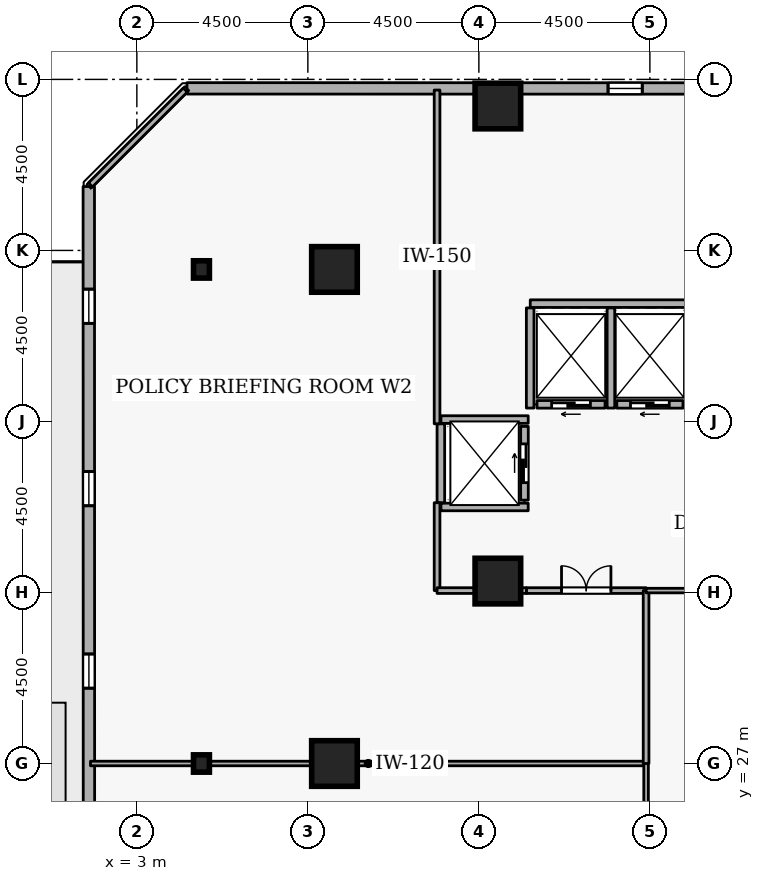
"""IFC4 building model, lengths in metres.
Left out: names, types, materials, properties, quantities, classifications, styles, units other than length and angle.
Written with IfcOpenShell. Run it as: python <this file> out.ifc"""

import sys

from ifc_helpers import new_model, si_unit, direction, frame, frame_2d, origin, origin_2d, place, context, subcontext, project, spatial, rectangle, i_section, extrude, element, fill, save


model = new_model("IFC4")
c1 = context("Model", 3, precision=1e-05, world=origin(), true_north=direction((0.0, 1.0)))
c2 = subcontext(c1, "Body", "Model", "MODEL_VIEW")
j1 = project(units=[si_unit("LENGTHUNIT", "METRE"), si_unit("PLANEANGLEUNIT", "RADIAN")], contexts=[c1])
p1 = place(None, origin())
s1 = spatial("IfcSite", under=j1, at=p1, CompositionType="ELEMENT")
p2 = place(p1, origin())
s2 = spatial("IfcBuilding", under=s1, at=p2, CompositionType="ELEMENT")
p3 = place(p2, frame((0.0, 0.0, 134.1)))
s3 = spatial("IfcBuildingStorey", under=s2, at=p3, CompositionType="ELEMENT", Elevation=134.1)
for number, where, z_axis, x_axis in (
    (1, (12.5, 44.3, 0.0), (0.0, 0.0, 1.0), (1.0, 0.0, 0.0)),
    (2, (8.2, 27.0, 0.0), (0.0, 0.0, 1.0), (1.0, 0.0, 0.0)),
    (3, (8.2, 40.0, 0.0), (0.0, 0.0, 1.0), (1.0, 0.0, 0.0)),
    (4, (12.5, 31.8, 0.0), (0.0, 0.0, 1.0), (1.0, 0.0, 0.0)),
):
    element("IfcColumn", number, at=place(p3, frame(where, z_axis=z_axis, x_axis=x_axis)), inside=s3, PredefinedType="COLUMN", context=c2, shape_type="SweptSolid", body=[
        extrude(rectangle(XDim=1.2, YDim=1.2, at=origin_2d()), origin(), (0.0, 0.0, 1.0), 3.6),
    ])
for number, where, z_axis, x_axis in (
    (5, (4.7, 27.0, 0.0), (0.0, 0.0, 1.0), (1.0, 0.0, 0.0)),
    (6, (4.7, 40.0, 0.0), (0.0, 0.0, 1.0), (1.0, 0.0, 0.0)),
):
    element("IfcColumn", number, at=place(p3, frame(where, z_axis=z_axis, x_axis=x_axis)), inside=s3, PredefinedType="COLUMN", context=c2, shape_type="SweptSolid", body=[
        extrude(i_section(OverallWidth=0.418, OverallDepth=0.456, WebThickness=0.042, FlangeThickness=0.067, FilletRadius=0.015, at=origin_2d()), origin(), (0.0, 0.0, 1.0), 3.6),
    ])
p4 = place(p3, frame((38.199, 44.756, 0.0), z_axis=(0.0, 0.0, 1.0), x_axis=(-0.999999969988, 0.000244999128, 0.0)))
e7 = element("IfcWall", 7, at=p4, inside=s3, PredefinedType="STANDARD", context=c2, shape_type="SweptSolid", body=[
    extrude(rectangle(XDim=33.881, YDim=0.3, at=frame_2d((16.94, 0.0))), origin(), (0.0, 0.0, 1.0), 2.7),
])
p5 = place(p4, frame((2.7, 0.0, 0.72)))
e8 = element("IfcOpeningElement", 8, at=p5, cuts=e7, PredefinedType="OPENING", context=c2, shape_type="SweptSolid", body=[
    extrude(rectangle(XDim=0.9, YDim=1.75, at=frame_2d((0.45, 0.875))), frame((0.0, 0.16, 0.0), z_axis=(0.0, -1.0, 0.0), x_axis=(1.0, 0.0, 0.0)), (0.0, 0.0, 1.0), 0.32),
])
p6 = place(p4, frame((7.5, 0.0, 0.72)))
e9 = element("IfcOpeningElement", 9, at=p6, cuts=e7, PredefinedType="OPENING", context=c2, shape_type="SweptSolid", body=[
    extrude(rectangle(XDim=0.9, YDim=1.75, at=frame_2d((0.45, 0.875))), frame((0.0, 0.16, 0.0), z_axis=(0.0, -1.0, 0.0), x_axis=(1.0, 0.0, 0.0)), (0.0, 0.0, 1.0), 0.32),
])
p7 = place(p4, frame((17.1, 0.0, 0.72)))
e10 = element("IfcOpeningElement", 10, at=p7, cuts=e7, PredefinedType="OPENING", context=c2, shape_type="SweptSolid", body=[
    extrude(rectangle(XDim=0.9, YDim=1.75, at=frame_2d((0.45, 0.875))), frame((0.0, 0.16, 0.0), z_axis=(0.0, -1.0, 0.0), x_axis=(1.0, 0.0, 0.0)), (0.0, 0.0, 1.0), 0.32),
])
p8 = place(p4, frame((21.9, 0.0, 0.72)))
e11 = element("IfcOpeningElement", 11, at=p8, cuts=e7, PredefinedType="OPENING", context=c2, shape_type="SweptSolid", body=[
    extrude(rectangle(XDim=0.9, YDim=1.75, at=frame_2d((0.45, 0.875))), frame((0.0, 0.16, 0.0), z_axis=(0.0, -1.0, 0.0), x_axis=(1.0, 0.0, 0.0)), (0.0, 0.0, 1.0), 0.32),
])
p9 = place(p3, frame((1.735, 42.181, 0.0), z_axis=(0.0, 0.0, 1.0), x_axis=(0.000244999128, -0.999999969988, 0.0)))
e12 = element("IfcWall", 12, at=p9, inside=s3, PredefinedType="STANDARD", context=c2, shape_type="SweptSolid", body=[
    extrude(rectangle(XDim=33.881, YDim=0.3, at=frame_2d((16.94, 0.0))), origin(), (0.0, 0.0, 1.0), 2.7),
])
p10 = place(p9, frame((18.74, 0.0, 0.0)))
e13 = element("IfcOpeningElement", 13, at=p10, cuts=e12, PredefinedType="OPENING", context=c2, shape_type="SweptSolid", body=[
    extrude(rectangle(XDim=1.0, YDim=2.08, at=frame_2d((0.5, 1.04))), frame((0.0, 0.16, 0.0), z_axis=(0.0, -1.0, 0.0), x_axis=(1.0, 0.0, 0.0)), (0.0, 0.0, 1.0), 0.32),
])
p11 = place(p9, frame((2.7, 0.0, 0.72)))
e14 = element("IfcOpeningElement", 14, at=p11, cuts=e12, PredefinedType="OPENING", context=c2, shape_type="SweptSolid", body=[
    extrude(rectangle(XDim=0.9, YDim=1.75, at=frame_2d((0.45, 0.875))), frame((0.0, 0.16, 0.0), z_axis=(0.0, -1.0, 0.0), x_axis=(1.0, 0.0, 0.0)), (0.0, 0.0, 1.0), 0.32),
])
p12 = place(p9, frame((7.5, 0.0, 0.72)))
e15 = element("IfcOpeningElement", 15, at=p12, cuts=e12, PredefinedType="OPENING", context=c2, shape_type="SweptSolid", body=[
    extrude(rectangle(XDim=0.9, YDim=1.75, at=frame_2d((0.45, 0.875))), frame((0.0, 0.16, 0.0), z_axis=(0.0, -1.0, 0.0), x_axis=(1.0, 0.0, 0.0)), (0.0, 0.0, 1.0), 0.32),
])
p13 = place(p9, frame((12.3, 0.0, 0.72)))
e16 = element("IfcOpeningElement", 16, at=p13, cuts=e12, PredefinedType="OPENING", context=c2, shape_type="SweptSolid", body=[
    extrude(rectangle(XDim=0.9, YDim=1.75, at=frame_2d((0.45, 0.875))), frame((0.0, 0.16, 0.0), z_axis=(0.0, -1.0, 0.0), x_axis=(1.0, 0.0, 0.0)), (0.0, 0.0, 1.0), 0.32),
])
p14 = place(p9, frame((21.9, 0.0, 0.72)))
e17 = element("IfcOpeningElement", 17, at=p14, cuts=e12, PredefinedType="OPENING", context=c2, shape_type="SweptSolid", body=[
    extrude(rectangle(XDim=0.9, YDim=1.75, at=frame_2d((0.45, 0.875))), frame((0.0, 0.16, 0.0), z_axis=(0.0, -1.0, 0.0), x_axis=(1.0, 0.0, 0.0)), (0.0, 0.0, 1.0), 0.32),
])
p15 = place(p9, frame((26.7, 0.0, 0.72)))
e18 = element("IfcOpeningElement", 18, at=p15, cuts=e12, PredefinedType="OPENING", context=c2, shape_type="SweptSolid", body=[
    extrude(rectangle(XDim=0.9, YDim=1.75, at=frame_2d((0.45, 0.875))), frame((0.0, 0.16, 0.0), z_axis=(0.0, -1.0, 0.0), x_axis=(1.0, 0.0, 0.0)), (0.0, 0.0, 1.0), 0.32),
])
p16 = place(p3, frame((17.37, 36.45, 0.0), z_axis=(0.0, 0.0, 1.0), x_axis=(-1.0, 0.0, 0.0)))
e19 = element("IfcWall", 19, at=p16, inside=s3, PredefinedType="STANDARD", context=c2, shape_type="SweptSolid", body=[
    extrude(rectangle(XDim=1.74, YDim=0.2, at=frame_2d((0.87, 0.0))), origin(), (0.0, 0.0, 1.0), 3.34),
])
p17 = place(p16, frame((0.36, 0.0, 0.0)))
e20 = element("IfcOpeningElement", 20, at=p17, cuts=e19, PredefinedType="OPENING", context=c2, shape_type="SweptSolid", body=[
    extrude(rectangle(XDim=1.02, YDim=2.06, at=frame_2d((0.51, 1.03))), frame((0.0, 0.11, 0.0), z_axis=(0.0, -1.0, 0.0), x_axis=(1.0, 0.0, 0.0)), (0.0, 0.0, 1.0), 0.22),
])
p18 = place(p3, frame((15.32, 36.45, 0.0), z_axis=(0.0, 0.0, 1.0), x_axis=(-1.0, 0.0, 0.0)))
e21 = element("IfcWall", 21, at=p18, inside=s3, PredefinedType="STANDARD", context=c2, shape_type="SweptSolid", body=[
    extrude(rectangle(XDim=1.79, YDim=0.2, at=frame_2d((0.895, 0.0))), origin(), (0.0, 0.0, 1.0), 3.34),
])
p19 = place(p18, frame((0.385, 0.0, 0.0)))
e22 = element("IfcOpeningElement", 22, at=p19, cuts=e21, PredefinedType="OPENING", context=c2, shape_type="SweptSolid", body=[
    extrude(rectangle(XDim=1.02, YDim=2.06, at=frame_2d((0.51, 1.03))), frame((0.0, 0.11, 0.0), z_axis=(0.0, -1.0, 0.0), x_axis=(1.0, 0.0, 0.0)), (0.0, 0.0, 1.0), 0.22),
])
p20 = place(p3, frame((13.2, 33.93, 0.0), z_axis=(0.0, 0.0, 1.0), x_axis=(0.0, 1.0, 0.0)))
e23 = element("IfcWall", 23, at=p20, inside=s3, PredefinedType="STANDARD", context=c2, shape_type="SweptSolid", body=[
    extrude(rectangle(XDim=1.94, YDim=0.2, at=frame_2d((0.97, 0.0))), origin(), (0.0, 0.0, 1.0), 3.34),
])
p21 = place(p20, frame((0.46, 0.0, 0.0)))
e24 = element("IfcOpeningElement", 24, at=p21, cuts=e23, PredefinedType="OPENING", context=c2, shape_type="SweptSolid", body=[
    extrude(rectangle(XDim=1.02, YDim=2.06, at=frame_2d((0.51, 1.03))), frame((0.0, 0.11, 0.0), z_axis=(0.0, -1.0, 0.0), x_axis=(1.0, 0.0, 0.0)), (0.0, 0.0, 1.0), 0.22),
])
p22 = place(p3, frame((13.352, 39.1, 0.0), z_axis=(0.0, 0.0, 1.0), x_axis=(1.0, 0.0, 0.0)))
e25 = element("IfcWall", 25, at=p22, inside=s3, PredefinedType="STANDARD", context=c2, shape_type="SweptSolid", body=[
    extrude(rectangle(XDim=4.196, YDim=0.2, at=frame_2d((2.098, 0.0))), origin(), (0.0, 0.0, 1.0), 3.34),
])
for number, where, z_axis, x_axis in (
    (26, (15.475, 36.352, 0.0), (0.0, 0.0, 1.0), (0.0, 1.0, 0.0)),
    (27, (13.35, 36.352, 0.0), (0.0, 0.0, 1.0), (0.0, 1.0, 0.0)),
):
    element("IfcWall", number, at=place(p3, frame(where, z_axis=z_axis, x_axis=x_axis)), inside=s3, PredefinedType="STANDARD", context=c2, shape_type="SweptSolid", body=[
        extrude(rectangle(XDim=2.636, YDim=0.2, at=frame_2d((1.318, 0.0))), origin(), (0.0, 0.0, 1.0), 3.34),
    ])
for number, where, z_axis, x_axis in (
    (28, (11.002, 36.05, 0.0), (0.0, 0.0, 1.0), (1.0, 0.0, 0.0)),
    (29, (11.002, 33.75, 0.0), (0.0, 0.0, 1.0), (1.0, 0.0, 0.0)),
):
    element("IfcWall", number, at=place(p3, frame(where, z_axis=z_axis, x_axis=x_axis)), inside=s3, PredefinedType="STANDARD", context=c2, shape_type="SweptSolid", body=[
        extrude(rectangle(XDim=2.296, YDim=0.2, at=frame_2d((1.148, 0.0))), origin(), (0.0, 0.0, 1.0), 3.34),
    ])
p23 = place(p3, frame((11.0, 33.862, 0.0), z_axis=(0.0, 0.0, 1.0), x_axis=(0.0, 1.0, 0.0)))
e30 = element("IfcWall", 30, at=p23, inside=s3, PredefinedType="STANDARD", context=c2, shape_type="SweptSolid", body=[
    extrude(rectangle(XDim=2.076, YDim=0.2, at=frame_2d((1.038, 0.0))), origin(), (0.0, 0.0, 1.0), 3.34),
])
p24 = place(p3, frame((1.78, 27.0, 0.0), z_axis=(0.0, 0.0, 1.0), x_axis=(1.0, 0.0, 0.0)))
e31 = element("IfcWall", 31, at=p24, inside=s3, PredefinedType="PARTITIONING", context=c2, shape_type="SweptSolid", body=[
    extrude(rectangle(XDim=14.62, YDim=0.12, at=frame_2d((7.31, 0.0))), origin(), (0.0, 0.0, 1.0), 2.878),
])
p25 = place(p3, frame((16.4, 27.0, 0.0), z_axis=(0.0, 0.0, 1.0), x_axis=(0.0, -1.0, 0.0)))
e32 = element("IfcWall", 32, at=p25, inside=s3, PredefinedType="PARTITIONING", context=c2, shape_type="SweptSolid", body=[
    extrude(rectangle(XDim=4.55, YDim=0.12, at=frame_2d((2.275, 0.0))), origin(), (0.0, 0.0, 1.0), 3.34),
])
p26 = place(p3, frame((13.25, 31.55, 0.0), z_axis=(0.0, 0.0, 1.0), x_axis=(1.0, 0.0, 0.0)))
e33 = element("IfcWall", 33, at=p26, inside=s3, PredefinedType="PARTITIONING", context=c2, shape_type="SweptSolid", body=[
    extrude(rectangle(XDim=3.15, YDim=0.15, at=frame_2d((1.575, 0.0))), origin(), (0.0, 0.0, 1.0), 3.34),
])
p27 = place(p26, frame((0.925, 0.0, 0.0)))
e34 = element("IfcOpeningElement", 34, at=p27, cuts=e33, PredefinedType="OPENING", context=c2, shape_type="SweptSolid", body=[
    extrude(rectangle(XDim=1.3, YDim=2.12, at=frame_2d((0.65, 1.06))), frame((0.0, 0.085, 0.0), z_axis=(0.0, -1.0, 0.0), x_axis=(1.0, 0.0, 0.0)), (0.0, 0.0, 1.0), 0.17),
])
p28 = place(p3, frame((16.4, 31.55, 0.0), z_axis=(0.0, 0.0, 1.0), x_axis=(0.0, -1.0, 0.0)))
e35 = element("IfcWall", 35, at=p28, inside=s3, PredefinedType="PARTITIONING", context=c2, shape_type="SweptSolid", body=[
    extrude(rectangle(XDim=4.55, YDim=0.15, at=frame_2d((2.275, 0.0))), origin(), (0.0, 0.0, 1.0), 3.34),
])
p29 = place(p3, frame((1.78, 42.225, 0.0), z_axis=(0.0, 0.0, 1.0), x_axis=(0.707106781187, 0.707106781187, 0.0)))
e36 = element("IfcWall", 36, at=p29, inside=s3, PredefinedType="PARTITIONING", context=c2, shape_type="SweptSolid", body=[
    extrude(rectangle(XDim=3.528, YDim=0.15, at=frame_2d((1.764, 0.0))), origin(), (0.0, 0.0, 1.0), 3.34),
])
p30 = place(p3, frame((10.9, 44.72, 0.0), z_axis=(0.0, 0.0, 1.0), x_axis=(0.0, -1.0, 0.0)))
e37 = element("IfcWall", 37, at=p30, inside=s3, PredefinedType="PARTITIONING", context=c2, shape_type="SweptSolid", body=[
    extrude(rectangle(XDim=8.782, YDim=0.15, at=frame_2d((4.391, 0.0))), origin(), (0.0, 0.0, 1.0), 3.34),
])
p31 = place(p3, frame((10.9, 33.862, 0.0), z_axis=(0.0, 0.0, 1.0), x_axis=(0.0, -1.0, 0.0)))
e38 = element("IfcWall", 38, at=p31, inside=s3, PredefinedType="PARTITIONING", context=c2, shape_type="SweptSolid", body=[
    extrude(rectangle(XDim=2.312, YDim=0.15, at=frame_2d((1.156, 0.0))), origin(), (0.0, 0.0, 1.0), 3.34),
])
p32 = place(p3, frame((10.9, 31.55, 0.0), z_axis=(0.0, 0.0, 1.0), x_axis=(1.0, 0.0, 0.0)))
e39 = element("IfcWall", 39, at=p32, inside=s3, PredefinedType="PARTITIONING", context=c2, shape_type="SweptSolid", body=[
    extrude(rectangle(XDim=2.35, YDim=0.15, at=frame_2d((1.175, 0.0))), origin(), (0.0, 0.0, 1.0), 3.34),
])
p33 = place(p3, frame((16.4, 31.55, 0.0), z_axis=(0.0, 0.0, 1.0), x_axis=(1.0, 0.0, 0.0)))
e40 = element("IfcWall", 40, at=p33, inside=s3, PredefinedType="PARTITIONING", context=c2, shape_type="SweptSolid", body=[
    extrude(rectangle(XDim=4.5, YDim=0.12, at=frame_2d((2.25, 0.0))), origin(), (0.0, 0.0, 1.0), 3.34),
])
p34 = place(p33, frame((1.775, 0.0, 0.0)))
e41 = element("IfcOpeningElement", 41, at=p34, cuts=e40, PredefinedType="OPENING", context=c2, shape_type="SweptSolid", body=[
    extrude(rectangle(XDim=0.95, YDim=2.1, at=frame_2d((0.475, 1.05))), frame((0.0, 0.07, 0.0), z_axis=(0.0, -1.0, 0.0), x_axis=(1.0, 0.0, 0.0)), (0.0, 0.0, 1.0), 0.14),
])
p35 = place(p8, origin())
e42 = element("IfcWindow", 42, at=p35, inside=s3, PartitioningType="SINGLE_PANEL", PredefinedType="WINDOW", context=c2, shape_type="SweptSolid", body=[
    extrude(rectangle(XDim=0.9, YDim=1.75, at=frame_2d((0.45, 0.875))), frame((0.0, 0.03, 0.0), z_axis=(0.0, -1.0, 0.0), x_axis=(1.0, 0.0, 0.0)), (0.0, 0.0, 1.0), 0.06),
])
fill(e11, e42)
p36 = place(p11, origin())
e43 = element("IfcWindow", 43, at=p36, inside=s3, PartitioningType="SINGLE_PANEL", PredefinedType="WINDOW", context=c2, shape_type="SweptSolid", body=[
    extrude(rectangle(XDim=0.9, YDim=1.75, at=frame_2d((0.45, 0.875))), frame((0.0, 0.03, 0.0), z_axis=(0.0, -1.0, 0.0), x_axis=(1.0, 0.0, 0.0)), (0.0, 0.0, 1.0), 0.06),
])
fill(e14, e43)
p37 = place(p12, origin())
e44 = element("IfcWindow", 44, at=p37, inside=s3, PartitioningType="SINGLE_PANEL", PredefinedType="WINDOW", context=c2, shape_type="SweptSolid", body=[
    extrude(rectangle(XDim=0.9, YDim=1.75, at=frame_2d((0.45, 0.875))), frame((0.0, 0.03, 0.0), z_axis=(0.0, -1.0, 0.0), x_axis=(1.0, 0.0, 0.0)), (0.0, 0.0, 1.0), 0.06),
])
fill(e15, e44)
p38 = place(p13, origin())
e45 = element("IfcWindow", 45, at=p38, inside=s3, PartitioningType="SINGLE_PANEL", PredefinedType="WINDOW", context=c2, shape_type="SweptSolid", body=[
    extrude(rectangle(XDim=0.9, YDim=1.75, at=frame_2d((0.45, 0.875))), frame((0.0, 0.03, 0.0), z_axis=(0.0, -1.0, 0.0), x_axis=(1.0, 0.0, 0.0)), (0.0, 0.0, 1.0), 0.06),
])
fill(e16, e45)
p39 = place(p17, origin())
e46 = element("IfcDoor", 46, at=p39, inside=s3, OperationType="SLIDING_TO_LEFT", PredefinedType="DOOR", context=c2, shape_type="SweptSolid", body=[
    extrude(rectangle(XDim=1.02, YDim=2.06, at=frame_2d((0.51, 1.03))), frame((0.0, 0.025, 0.0), z_axis=(0.0, -1.0, 0.0), x_axis=(1.0, 0.0, 0.0)), (0.0, 0.0, 1.0), 0.05),
])
fill(e20, e46)
p40 = place(p19, origin())
e47 = element("IfcDoor", 47, at=p40, inside=s3, OperationType="SLIDING_TO_LEFT", PredefinedType="DOOR", context=c2, shape_type="SweptSolid", body=[
    extrude(rectangle(XDim=1.02, YDim=2.06, at=frame_2d((0.51, 1.03))), frame((0.0, 0.025, 0.0), z_axis=(0.0, -1.0, 0.0), x_axis=(1.0, 0.0, 0.0)), (0.0, 0.0, 1.0), 0.05),
])
fill(e22, e47)
p41 = place(p21, origin())
e48 = element("IfcDoor", 48, at=p41, inside=s3, OperationType="SLIDING_TO_LEFT", PredefinedType="DOOR", context=c2, shape_type="SweptSolid", body=[
    extrude(rectangle(XDim=1.02, YDim=2.06, at=frame_2d((0.51, 1.03))), frame((0.0, 0.025, 0.0), z_axis=(0.0, -1.0, 0.0), x_axis=(1.0, 0.0, 0.0)), (0.0, 0.0, 1.0), 0.05),
])
fill(e24, e48)
p42 = place(p27, origin())
e49 = element("IfcDoor", 49, at=p42, inside=s3, OperationType="DOUBLE_DOOR_SINGLE_SWING", PredefinedType="DOOR", context=c2, shape_type="SweptSolid", body=[
    extrude(rectangle(XDim=1.3, YDim=2.12, at=frame_2d((0.65, 1.06))), frame((0.0, 0.025, 0.0), z_axis=(0.0, -1.0, 0.0), x_axis=(1.0, 0.0, 0.0)), (0.0, 0.0, 1.0), 0.05),
])
fill(e34, e49)
save(model, sys.argv[1])
